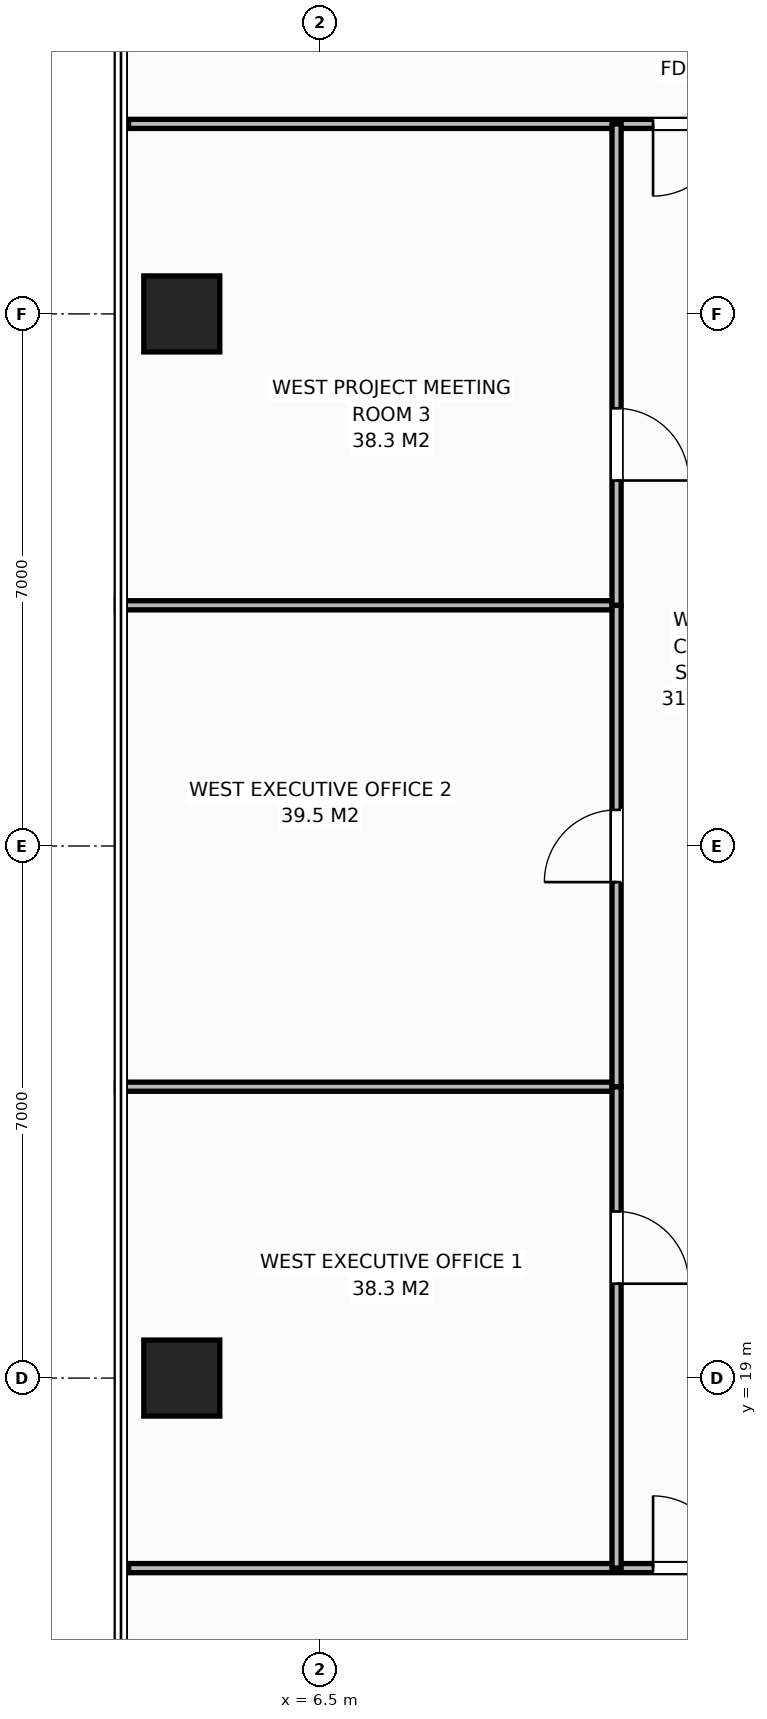
"""IFC4 building model, lengths in metres.
Left out: names, types, materials, properties, quantities, classifications, styles, units other than length and angle.
Written with IfcOpenShell. Run it as: python <this file> out.ifc"""

import sys

from ifc_helpers import new_model, si_unit, direction, frame, frame_2d, origin, origin_2d, place, context, subcontext, project, spatial, rectangle, extrude, element, fill, save


model = new_model("IFC4")
c1 = context("Model", 3, precision=1e-05, world=origin(), true_north=direction((0.0, 1.0)))
c2 = subcontext(c1, "Body", "Model", "MODEL_VIEW")
j1 = project(units=[si_unit("LENGTHUNIT", "METRE"), si_unit("PLANEANGLEUNIT", "RADIAN")], contexts=[c1])
p1 = place(None, origin())
s1 = spatial("IfcSite", under=j1, at=p1, CompositionType="ELEMENT")
p2 = place(p1, origin())
s2 = spatial("IfcBuilding", under=s1, at=p2, CompositionType="ELEMENT")
p3 = place(p2, frame((0.0, 0.0, 151.8)))
s3 = spatial("IfcBuildingStorey", under=s2, at=p3, CompositionType="ELEMENT", Elevation=151.8)
for number, where, z_axis, x_axis in (
    (1, (4.68, 19.0, 0.0), (0.0, 0.0, 1.0), (1.0, 0.0, 0.0)),
    (2, (4.68, 33.0, 0.0), (0.0, 0.0, 1.0), (1.0, 0.0, 0.0)),
):
    element("IfcColumn", number, at=place(p3, frame(where, z_axis=z_axis, x_axis=x_axis)), inside=s3, PredefinedType="COLUMN", context=c2, shape_type="SweptSolid", body=[
        extrude(rectangle(XDim=1.0, YDim=1.0, at=origin_2d()), origin(), (0.0, 0.0, 1.0), 3.8),
    ])
p4 = place(p3, frame((3.98, 35.5, 0.0), z_axis=(0.0, 0.0, 1.0), x_axis=(1.0, 0.0, 0.0)))
e3 = element("IfcWall", 3, at=p4, inside=s3, PredefinedType="PARTITIONING", context=c2, shape_type="SweptSolid", body=[
    extrude(rectangle(XDim=11.09, YDim=0.12, at=frame_2d((5.545, 0.0))), origin(), (0.0, 0.0, 1.0), 3.572),
])
p5 = place(p4, frame((6.9, 0.0, 0.0)))
e4 = element("IfcOpeningElement", 4, at=p5, cuts=e3, PredefinedType="OPENING", context=c2, shape_type="SweptSolid", body=[
    extrude(rectangle(XDim=0.95, YDim=2.15, at=frame_2d((0.475, 1.075))), frame((0.0, 0.07, 0.0), z_axis=(0.0, -1.0, 0.0), x_axis=(1.0, 0.0, 0.0)), (0.0, 0.0, 1.0), 0.14),
])
p6 = place(p3, frame((3.98, 16.5, 0.0), z_axis=(0.0, 0.0, 1.0), x_axis=(1.0, 0.0, 0.0)))
e5 = element("IfcWall", 5, at=p6, inside=s3, PredefinedType="PARTITIONING", context=c2, shape_type="SweptSolid", body=[
    extrude(rectangle(XDim=9.16, YDim=0.12, at=frame_2d((4.58, 0.0))), origin(), (0.0, 0.0, 1.0), 3.572),
])
p7 = place(p6, frame((6.9, 0.0, 0.0)))
e6 = element("IfcOpeningElement", 6, at=p7, cuts=e5, PredefinedType="OPENING", context=c2, shape_type="SweptSolid", body=[
    extrude(rectangle(XDim=0.95, YDim=2.15, at=frame_2d((0.475, 1.075))), frame((0.0, 0.07, 0.0), z_axis=(0.0, -1.0, 0.0), x_axis=(1.0, 0.0, 0.0)), (0.0, 0.0, 1.0), 0.14),
])
p8 = place(p3, frame((3.82, 22.833, 0.0), z_axis=(0.0, 0.0, 1.0), x_axis=(1.0, 0.0, 0.0)))
e7 = element("IfcWall", 7, at=p8, inside=s3, PredefinedType="PARTITIONING", context=c2, shape_type="SweptSolid", body=[
    extrude(rectangle(XDim=6.58, YDim=0.12, at=frame_2d((3.29, 0.0))), origin(), (0.0, 0.0, 1.0), 3.572),
])
p9 = place(p3, frame((10.4, 16.5, 0.0), z_axis=(0.0, 0.0, 1.0), x_axis=(0.0, 1.0, 0.0)))
e8 = element("IfcWall", 8, at=p9, inside=s3, PredefinedType="PARTITIONING", context=c2, shape_type="SweptSolid", body=[
    extrude(rectangle(XDim=6.333, YDim=0.12, at=frame_2d((3.167, 0.0))), origin(), (0.0, 0.0, 1.0), 3.572),
])
p10 = place(p9, frame((3.742, 0.0, 0.0)))
e9 = element("IfcOpeningElement", 9, at=p10, cuts=e8, PredefinedType="OPENING", context=c2, shape_type="SweptSolid", body=[
    extrude(rectangle(XDim=0.95, YDim=2.15, at=frame_2d((0.475, 1.075))), frame((0.0, 0.07, 0.0), z_axis=(0.0, -1.0, 0.0), x_axis=(1.0, 0.0, 0.0)), (0.0, 0.0, 1.0), 0.14),
])
p11 = place(p3, frame((3.82, 29.167, 0.0), z_axis=(0.0, 0.0, 1.0), x_axis=(1.0, 0.0, 0.0)))
e10 = element("IfcWall", 10, at=p11, inside=s3, PredefinedType="PARTITIONING", context=c2, shape_type="SweptSolid", body=[
    extrude(rectangle(XDim=6.58, YDim=0.12, at=frame_2d((3.29, 0.0))), origin(), (0.0, 0.0, 1.0), 3.572),
])
p12 = place(p3, frame((10.4, 22.833, 0.0), z_axis=(0.0, 0.0, 1.0), x_axis=(0.0, 1.0, 0.0)))
e11 = element("IfcWall", 11, at=p12, inside=s3, PredefinedType="PARTITIONING", context=c2, shape_type="SweptSolid", body=[
    extrude(rectangle(XDim=6.333, YDim=0.12, at=frame_2d((3.167, 0.0))), origin(), (0.0, 0.0, 1.0), 3.572),
])
p13 = place(p12, frame((2.692, 0.0, 0.0)))
e12 = element("IfcOpeningElement", 12, at=p13, cuts=e11, PredefinedType="OPENING", context=c2, shape_type="SweptSolid", body=[
    extrude(rectangle(XDim=0.95, YDim=2.15, at=frame_2d((0.475, 1.075))), frame((0.0, 0.07, 0.0), z_axis=(0.0, -1.0, 0.0), x_axis=(1.0, 0.0, 0.0)), (0.0, 0.0, 1.0), 0.14),
])
p14 = place(p3, frame((10.4, 29.167, 0.0), z_axis=(0.0, 0.0, 1.0), x_axis=(0.0, 1.0, 0.0)))
e13 = element("IfcWall", 13, at=p14, inside=s3, PredefinedType="PARTITIONING", context=c2, shape_type="SweptSolid", body=[
    extrude(rectangle(XDim=6.333, YDim=0.12, at=frame_2d((3.167, 0.0))), origin(), (0.0, 0.0, 1.0), 3.572),
])
p15 = place(p14, frame((1.642, 0.0, 0.0)))
e14 = element("IfcOpeningElement", 14, at=p15, cuts=e13, PredefinedType="OPENING", context=c2, shape_type="SweptSolid", body=[
    extrude(rectangle(XDim=0.95, YDim=2.15, at=frame_2d((0.475, 1.075))), frame((0.0, 0.07, 0.0), z_axis=(0.0, -1.0, 0.0), x_axis=(1.0, 0.0, 0.0)), (0.0, 0.0, 1.0), 0.14),
])
p16 = place(p5, origin())
e15 = element("IfcDoor", 15, at=p16, inside=s3, OperationType="SINGLE_SWING_RIGHT", PredefinedType="DOOR", context=c2, shape_type="SweptSolid", body=[
    extrude(rectangle(XDim=0.95, YDim=2.15, at=frame_2d((0.475, 1.075))), frame((0.0, 0.025, 0.0), z_axis=(0.0, -1.0, 0.0), x_axis=(1.0, 0.0, 0.0)), (0.0, 0.0, 1.0), 0.05),
])
fill(e4, e15)
p17 = place(p7, origin())
e16 = element("IfcDoor", 16, at=p17, inside=s3, OperationType="SINGLE_SWING_LEFT", PredefinedType="DOOR", context=c2, shape_type="SweptSolid", body=[
    extrude(rectangle(XDim=0.95, YDim=2.15, at=frame_2d((0.475, 1.075))), frame((0.0, 0.025, 0.0), z_axis=(0.0, -1.0, 0.0), x_axis=(1.0, 0.0, 0.0)), (0.0, 0.0, 1.0), 0.05),
])
fill(e6, e16)
p18 = place(p10, origin())
e17 = element("IfcDoor", 17, at=p18, inside=s3, OperationType="SINGLE_SWING_RIGHT", PredefinedType="DOOR", context=c2, shape_type="SweptSolid", body=[
    extrude(rectangle(XDim=0.95, YDim=2.15, at=frame_2d((0.475, 1.075))), frame((0.0, 0.025, 0.0), z_axis=(0.0, -1.0, 0.0), x_axis=(1.0, 0.0, 0.0)), (0.0, 0.0, 1.0), 0.05),
])
fill(e9, e17)
p19 = place(p13, origin())
e18 = element("IfcDoor", 18, at=p19, inside=s3, OperationType="SINGLE_SWING_LEFT", PredefinedType="DOOR", context=c2, shape_type="SweptSolid", body=[
    extrude(rectangle(XDim=0.95, YDim=2.15, at=frame_2d((0.475, 1.075))), frame((0.0, 0.025, 0.0), z_axis=(0.0, -1.0, 0.0), x_axis=(1.0, 0.0, 0.0)), (0.0, 0.0, 1.0), 0.05),
])
fill(e12, e18)
p20 = place(p15, origin())
e19 = element("IfcDoor", 19, at=p20, inside=s3, OperationType="SINGLE_SWING_RIGHT", PredefinedType="DOOR", context=c2, shape_type="SweptSolid", body=[
    extrude(rectangle(XDim=0.95, YDim=2.15, at=frame_2d((0.475, 1.075))), frame((0.0, 0.025, 0.0), z_axis=(0.0, -1.0, 0.0), x_axis=(1.0, 0.0, 0.0)), (0.0, 0.0, 1.0), 0.05),
])
fill(e14, e19)
save(model, sys.argv[1])
